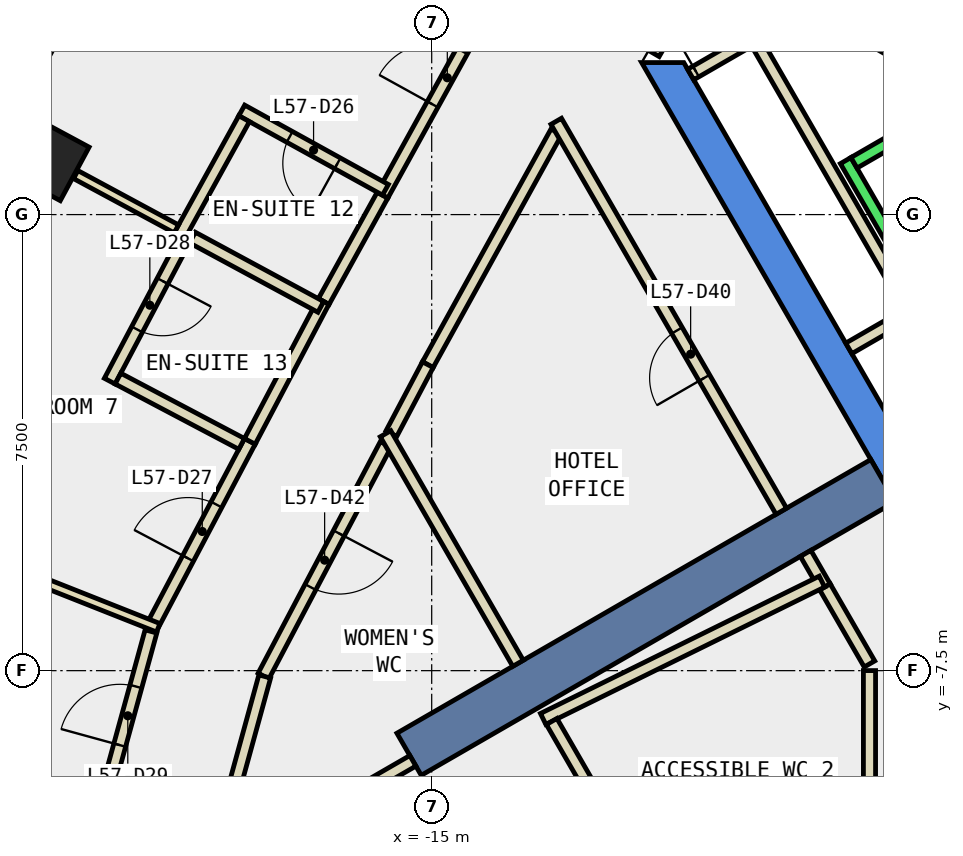
"""IFC4 building model, lengths in metres.
Left out: names, types, materials, properties, quantities, classifications, styles, units other than length and angle.
Written with IfcOpenShell. Run it as: python <this file> out.ifc"""

import sys

from ifc_helpers import new_model, si_unit, direction, frame, frame_2d, origin, origin_2d, place, context, subcontext, project, spatial, polyline, rectangle, outline, extrude, element, fill, save


model = new_model("IFC4")
c1 = context("Model", 3, precision=1e-05, world=origin(), true_north=direction((0.0, 1.0)))
c2 = subcontext(c1, "Body", "Model", "MODEL_VIEW")
j1 = project(units=[si_unit("LENGTHUNIT", "METRE"), si_unit("PLANEANGLEUNIT", "RADIAN")], contexts=[c1])
p1 = place(None, origin())
s1 = spatial("IfcSite", under=j1, at=p1, CompositionType="ELEMENT")
p2 = place(p1, origin())
s2 = spatial("IfcBuilding", under=s1, at=p2, CompositionType="ELEMENT")
p3 = place(p2, frame((0.0, 0.0, 252.2)))
s3 = spatial("IfcBuildingStorey", under=s2, at=p3, CompositionType="ELEMENT", Elevation=252.2)
p4 = place(p3, frame((-21.488, 1.001, -0.34), z_axis=(0.0, 0.0, 1.0), x_axis=(0.473980634908, 0.880535267739, 0.0)))
e1 = element("IfcColumn", 1, at=p4, inside=s3, PredefinedType="COLUMN", context=c2, shape_type="SweptSolid", body=[
    extrude(rectangle(XDim=1.0, YDim=1.4, at=origin_2d()), origin(), (0.0, 0.0, 1.0), 3.6),
])
p5 = place(p3, frame((0.0, 0.0, -0.34)))
e2 = element("IfcWall", 2, at=p5, inside=s3, PredefinedType="SHEAR", context=c2, shape_type="SweptSolid", body=[
    extrude(outline(polyline([(-11.547, 2.5), (-5.774, -7.5), (-5.427, -6.9), (-10.854, 2.5), (-11.547, 2.5)])), origin(), (0.0, 0.0, 1.0), 3.6),
])
p6 = place(p3, frame((-7.578, -4.375, -0.34), z_axis=(0.0, 0.0, 1.0), x_axis=(-0.866024315419, -0.5000018851, 0.0)))
e3 = element("IfcWall", 3, at=p6, inside=s3, PredefinedType="SHEAR", context=c2, shape_type="SweptSolid", body=[
    extrude(rectangle(XDim=9.0, YDim=0.8, at=frame_2d((4.5, 0.0))), origin(), (0.0, 0.0, 1.0), 3.6),
])
p7 = place(p3, frame((-19.199, 6.697, 0.0), z_axis=(0.0, 0.0, 1.0), x_axis=(-0.483469062695, -0.875361448441, 0.0)))
e4 = element("IfcWall", 4, at=p7, inside=s3, PredefinedType="STANDARD", context=c2, shape_type="SweptSolid", body=[
    extrude(rectangle(XDim=5.601, YDim=0.3, at=frame_2d((2.801, 0.0))), origin(), (0.0, 0.0, 1.0), 3.26),
])
p8 = place(p7, frame((0.45, 0.0, 0.9)))
e5 = element("IfcOpeningElement", 5, at=p8, cuts=e4, PredefinedType="OPENING", context=c2, shape_type="SweptSolid", body=[
    extrude(rectangle(XDim=1.9, YDim=2.0, at=frame_2d((0.95, 1.0))), frame((0.0, 0.16, 0.0), z_axis=(0.0, -1.0, 0.0), x_axis=(1.0, 0.0, 0.0)), (0.0, 0.0, 1.0), 0.32),
])
p9 = place(p7, frame((3.251, 0.0, 0.9)))
e6 = element("IfcOpeningElement", 6, at=p9, cuts=e4, PredefinedType="OPENING", context=c2, shape_type="SweptSolid", body=[
    extrude(rectangle(XDim=1.9, YDim=2.0, at=frame_2d((0.95, 1.0))), frame((0.0, 0.16, 0.0), z_axis=(0.0, -1.0, 0.0), x_axis=(1.0, 0.0, 0.0)), (0.0, 0.0, 1.0), 0.32),
])
p10 = place(p3, frame((-8.532, -6.123, 0.0), z_axis=(0.0, 0.0, 1.0), x_axis=(-0.499977104415, 0.866038622153, 0.0)))
e7 = element("IfcWall", 7, at=p10, inside=s3, PredefinedType="PARTITIONING", context=c2, shape_type="SweptSolid", body=[
    extrude(rectangle(XDim=0.636, YDim=0.2, at=frame_2d((0.318, 0.0))), origin(), (0.0, 0.0, 1.0), 3.26),
])
p11 = place(p3, frame((-12.95, 1.36, 0.0), z_axis=(0.0, 0.0, 1.0), x_axis=(-0.483418231124, -0.875389521194, 0.0)))
e8 = element("IfcWall", 8, at=p11, inside=s3, PredefinedType="PARTITIONING", context=c2, shape_type="SweptSolid", body=[
    extrude(rectangle(XDim=4.373, YDim=0.2, at=frame_2d((2.187, 0.0))), origin(), (0.0, 0.0, 1.0), 3.26),
])
p12 = place(p3, frame((-15.064, -2.468, 0.0), z_axis=(0.0, 0.0, 1.0), x_axis=(-0.467126648849, -0.884190417238, 0.0)))
e9 = element("IfcWall", 9, at=p12, inside=s3, PredefinedType="PARTITIONING", context=c2, shape_type="SweptSolid", body=[
    extrude(rectangle(XDim=1.282, YDim=0.2, at=frame_2d((0.641, 0.0))), origin(), (0.0, 0.0, 1.0), 3.26),
])
p13 = place(p3, frame((-7.8, -7.39, 0.0), z_axis=(0.0, 0.0, 1.0), x_axis=(-0.500266477503, 0.865871498253, 0.0)))
e10 = element("IfcWall", 10, at=p13, inside=s3, PredefinedType="PARTITIONING", context=c2, shape_type="SweptSolid", body=[
    extrude(rectangle(XDim=1.463, YDim=0.2, at=frame_2d((0.731, 0.0))), origin(), (0.0, 0.0, 1.0), 3.26),
])
p14 = place(p3, frame((-15.756, -3.779, 0.0), z_axis=(0.0, 0.0, 1.0), x_axis=(-0.46672043873, -0.884404902786, 0.0)))
e11 = element("IfcWall", 11, at=p14, inside=s3, PredefinedType="PARTITIONING", context=c2, shape_type="SweptSolid", body=[
    extrude(rectangle(XDim=4.307, YDim=0.2, at=frame_2d((2.153, 0.0))), origin(), (0.0, 0.0, 1.0), 3.26),
])
p15 = place(p14, frame((1.653, 0.0, 0.0)))
e12 = element("IfcOpeningElement", 12, at=p15, cuts=e11, PredefinedType="OPENING", context=c2, shape_type="SweptSolid", body=[
    extrude(rectangle(XDim=1.0, YDim=2.1, at=frame_2d((0.5, 1.05))), frame((0.0, 0.11, 0.0), z_axis=(0.0, -1.0, 0.0), x_axis=(1.0, 0.0, 0.0)), (0.0, 0.0, 1.0), 0.22),
])
p16 = place(p3, frame((-17.746, -7.596, 0.0), z_axis=(0.0, 0.0, 1.0), x_axis=(-0.264859637197, -0.96428697626, 0.0)))
e13 = element("IfcWall", 13, at=p16, inside=s3, PredefinedType="PARTITIONING", context=c2, shape_type="SweptSolid", body=[
    extrude(rectangle(XDim=2.122, YDim=0.2, at=frame_2d((1.061, 0.0))), origin(), (0.0, 0.0, 1.0), 3.26),
])
p17 = place(p3, frame((-15.809, 0.32, 0.0), z_axis=(0.0, 0.0, 1.0), x_axis=(0.483322920175, 0.875442148193, 0.0)))
e14 = element("IfcWall", 14, at=p17, inside=s3, PredefinedType="PARTITIONING", context=c2, shape_type="SweptSolid", body=[
    extrude(rectangle(XDim=4.31, YDim=0.2, at=frame_2d((2.155, 0.0))), origin(), (0.0, 0.0, 1.0), 3.26),
])
p18 = place(p17, frame((1.705, 0.0, 0.0)))
e15 = element("IfcOpeningElement", 15, at=p18, cuts=e14, PredefinedType="OPENING", context=c2, shape_type="SweptSolid", body=[
    extrude(rectangle(XDim=1.0, YDim=2.1, at=frame_2d((0.5, 1.05))), frame((0.0, 0.11, 0.0), z_axis=(0.0, -1.0, 0.0), x_axis=(1.0, 0.0, 0.0)), (0.0, 0.0, 1.0), 0.22),
])
p19 = place(p3, frame((-16.776, -1.43, 0.0), z_axis=(0.0, 0.0, 1.0), x_axis=(0.48360724937, 0.87528511261, 0.0)))
e16 = element("IfcWall", 16, at=p19, inside=s3, PredefinedType="PARTITIONING", context=c2, shape_type="SweptSolid", body=[
    extrude(rectangle(XDim=1.997, YDim=0.2, at=frame_2d((0.999, 0.0))), origin(), (0.0, 0.0, 1.0), 3.26),
])
p20 = place(p3, frame((-19.602, -6.781, 0.0), z_axis=(0.0, 0.0, 1.0), x_axis=(0.466827780692, 0.884348247679, 0.0)))
e17 = element("IfcWall", 17, at=p20, inside=s3, PredefinedType="PARTITIONING", context=c2, shape_type="SweptSolid", body=[
    extrude(rectangle(XDim=3.451, YDim=0.2, at=frame_2d((1.726, 0.0))), origin(), (0.0, 0.0, 1.0), 3.26),
])
p21 = place(p20, frame((1.275, 0.0, 0.0)))
e18 = element("IfcOpeningElement", 18, at=p21, cuts=e17, PredefinedType="OPENING", context=c2, shape_type="SweptSolid", body=[
    extrude(rectangle(XDim=1.0, YDim=2.1, at=frame_2d((0.5, 1.05))), frame((0.0, 0.11, 0.0), z_axis=(0.0, -1.0, 0.0), x_axis=(1.0, 0.0, 0.0)), (0.0, 0.0, 1.0), 0.22),
])
p22 = place(p3, frame((-17.991, -3.729, 0.0), z_axis=(0.0, 0.0, 1.0), x_axis=(0.466450569784, 0.88454726609, 0.0)))
e19 = element("IfcWall", 19, at=p22, inside=s3, PredefinedType="PARTITIONING", context=c2, shape_type="SweptSolid", body=[
    extrude(rectangle(XDim=2.6, YDim=0.2, at=frame_2d((1.3, 0.0))), origin(), (0.0, 0.0, 1.0), 3.26),
])
p23 = place(p3, frame((-20.379, -9.629, 0.0), z_axis=(0.0, 0.0, 1.0), x_axis=(0.26487636938, 0.964282380293, 0.0)))
e20 = element("IfcWall", 20, at=p23, inside=s3, PredefinedType="PARTITIONING", context=c2, shape_type="SweptSolid", body=[
    extrude(rectangle(XDim=2.877, YDim=0.2, at=frame_2d((1.438, 0.0))), origin(), (0.0, 0.0, 1.0), 3.26),
])
p24 = place(p23, frame((0.938, 0.0, 0.0)))
e21 = element("IfcOpeningElement", 21, at=p24, cuts=e20, PredefinedType="OPENING", context=c2, shape_type="SweptSolid", body=[
    extrude(rectangle(XDim=1.0, YDim=2.1, at=frame_2d((0.5, 1.05))), frame((0.0, 0.11, 0.0), z_axis=(0.0, -1.0, 0.0), x_axis=(1.0, 0.0, 0.0)), (0.0, 0.0, 1.0), 0.22),
])
p25 = place(p3, frame((-10.741, 2.303, 0.0), z_axis=(0.0, 0.0, 1.0), x_axis=(0.866063652425, 0.499933745558, 0.0)))
e22 = element("IfcWall", 22, at=p25, inside=s3, PredefinedType="PARTITIONING", context=c2, shape_type="SweptSolid", body=[
    extrude(rectangle(XDim=1.1, YDim=0.2, at=frame_2d((0.55, 0.0))), origin(), (0.0, 0.0, 1.0), 3.26),
])
p26 = place(p25, frame((0.1, 0.0, 0.0)))
e23 = element("IfcOpeningElement", 23, at=p26, cuts=e22, PredefinedType="OPENING", context=c2, shape_type="SweptSolid", body=[
    extrude(rectangle(XDim=0.9, YDim=2.1, at=frame_2d((0.45, 1.05))), frame((0.0, 0.11, 0.0), z_axis=(0.0, -1.0, 0.0), x_axis=(1.0, 0.0, 0.0)), (0.0, 0.0, 1.0), 0.22),
])
p27 = place(p3, frame((-9.751, 2.99, 0.0), z_axis=(0.0, 0.0, 1.0), x_axis=(0.499955951776, -0.866050833545, 0.0)))
e24 = element("IfcWall", 24, at=p27, inside=s3, PredefinedType="PARTITIONING", context=c2, shape_type="SweptSolid", body=[
    extrude(rectangle(XDim=5.4, YDim=0.2, at=frame_2d((2.7, 0.0))), origin(), (0.0, 0.0, 1.0), 3.26),
])
p28 = place(p3, frame((-7.188, -1.65, 0.0), z_axis=(0.0, 0.0, 1.0), x_axis=(-0.865841558281, -0.500318294642, 0.0)))
e25 = element("IfcWall", 25, at=p28, inside=s3, PredefinedType="PARTITIONING", context=c2, shape_type="SweptSolid", body=[
    extrude(rectangle(XDim=1.099, YDim=0.2, at=frame_2d((0.55, 0.0))), origin(), (0.0, 0.0, 1.0), 3.26),
])
p29 = place(p3, frame((-7.8, -12.184, 0.0), z_axis=(0.0, 0.0, 1.0), x_axis=(0.0, 1.0, 0.0)))
e26 = element("IfcWall", 26, at=p29, inside=s3, PredefinedType="PARTITIONING", context=c2, shape_type="SweptSolid", body=[
    extrude(rectangle(XDim=4.685, YDim=0.2, at=frame_2d((2.343, 0.0))), origin(), (0.0, 0.0, 1.0), 3.26),
])
p30 = place(p3, frame((-8.582, -6.036, 0.0), z_axis=(0.0, 0.0, 1.0), x_axis=(-0.897105141673, -0.441817116897, 0.0)))
e27 = element("IfcWall", 27, at=p30, inside=s3, PredefinedType="PARTITIONING", context=c2, shape_type="SweptSolid", body=[
    extrude(rectangle(XDim=5.111, YDim=0.2, at=frame_2d((2.555, 0.0))), origin(), (0.0, 0.0, 1.0), 3.26),
])
p31 = place(p3, frame((-13.58, -7.379, 0.0), z_axis=(0.0, 0.0, 1.0), x_axis=(-0.499916403993, 0.866073662582, 0.0)))
e28 = element("IfcWall", 28, at=p31, inside=s3, PredefinedType="PARTITIONING", context=c2, shape_type="SweptSolid", body=[
    extrude(rectangle(XDim=4.359, YDim=0.2, at=frame_2d((2.179, 0.0))), origin(), (0.0, 0.0, 1.0), 3.26),
])
p32 = place(p3, frame((-10.876, -12.062, 0.0), z_axis=(0.0, 0.0, 1.0), x_axis=(-0.499977877545, 0.866038175813, 0.0)))
e29 = element("IfcWall", 29, at=p32, inside=s3, PredefinedType="PARTITIONING", context=c2, shape_type="SweptSolid", body=[
    extrude(rectangle(XDim=4.302, YDim=0.2, at=frame_2d((2.151, 0.0))), origin(), (0.0, 0.0, 1.0), 3.26),
])
p33 = place(p3, frame((-15.31, -8.983, 0.0), z_axis=(0.0, 0.0, 1.0), x_axis=(-0.866047943894, -0.499960957353, 0.0)))
e30 = element("IfcWall", 30, at=p33, inside=s3, PredefinedType="PARTITIONING", context=c2, shape_type="SweptSolid", body=[
    extrude(rectangle(XDim=3.16, YDim=0.2, at=frame_2d((1.58, 0.0))), origin(), (0.0, 0.0, 1.0), 3.26),
])
p34 = place(p3, frame((-15.761, 0.408, 0.0), z_axis=(0.0, 0.0, 1.0), x_axis=(-0.875391622802, 0.483414425445, 0.0)))
e31 = element("IfcWall", 31, at=p34, inside=s3, PredefinedType="PARTITIONING", context=c2, shape_type="SweptSolid", body=[
    extrude(rectangle(XDim=2.699, YDim=0.2, at=frame_2d((1.35, 0.0))), origin(), (0.0, 0.0, 1.0), 3.26),
])
p35 = place(p34, frame((0.9, 0.0, 0.0)))
e32 = element("IfcOpeningElement", 32, at=p35, cuts=e31, PredefinedType="OPENING", context=c2, shape_type="SweptSolid", body=[
    extrude(rectangle(XDim=0.9, YDim=2.1, at=frame_2d((0.45, 1.05))), frame((0.0, 0.11, 0.0), z_axis=(0.0, -1.0, 0.0), x_axis=(1.0, 0.0, 0.0)), (0.0, 0.0, 1.0), 0.22),
])
p36 = place(p3, frame((-18.085, 1.577, 0.0), z_axis=(0.0, 0.0, 1.0), x_axis=(-0.483329790342, -0.875438355207, 0.0)))
e33 = element("IfcWall", 33, at=p36, inside=s3, PredefinedType="PARTITIONING", context=c2, shape_type="SweptSolid", body=[
    extrude(rectangle(XDim=2.224, YDim=0.2, at=frame_2d((1.112, 0.0))), origin(), (0.0, 0.0, 1.0), 3.26),
])
p37 = place(p3, frame((-19.199, -0.235, 0.0), z_axis=(0.0, 0.0, 1.0), x_axis=(-0.880166754904, 0.474664601126, 0.0)))
e34 = element("IfcWall", 34, at=p37, inside=s3, PredefinedType="PARTITIONING", context=c2, shape_type="SweptSolid", body=[
    extrude(rectangle(XDim=1.881, YDim=0.15, at=frame_2d((0.941, 0.0))), origin(), (0.0, 0.0, 1.0), 3.26),
])
p38 = place(p3, frame((-16.824, -1.518, 0.0), z_axis=(0.0, 0.0, 1.0), x_axis=(-0.879879019938, 0.47519775912, 0.0)))
e35 = element("IfcWall", 35, at=p38, inside=s3, PredefinedType="PARTITIONING", context=c2, shape_type="SweptSolid", body=[
    extrude(rectangle(XDim=2.399, YDim=0.2, at=frame_2d((1.2, 0.0))), origin(), (0.0, 0.0, 1.0), 3.26),
])
p39 = place(p3, frame((-19.069, -0.418, 0.0), z_axis=(0.0, 0.0, 1.0), x_axis=(-0.467007153784, -0.884253537349, 0.0)))
e36 = element("IfcWall", 36, at=p39, inside=s3, PredefinedType="PARTITIONING", context=c2, shape_type="SweptSolid", body=[
    extrude(rectangle(XDim=2.625, YDim=0.2, at=frame_2d((1.312, 0.0))), origin(), (0.0, 0.0, 1.0), 3.26),
])
p40 = place(p39, frame((0.763, 0.0, 0.0)))
e37 = element("IfcOpeningElement", 37, at=p40, cuts=e36, PredefinedType="OPENING", context=c2, shape_type="SweptSolid", body=[
    extrude(rectangle(XDim=0.9, YDim=2.1, at=frame_2d((0.45, 1.05))), frame((0.0, 0.11, 0.0), z_axis=(0.0, -1.0, 0.0), x_axis=(1.0, 0.0, 0.0)), (0.0, 0.0, 1.0), 0.22),
])
p41 = place(p3, frame((-20.16, -2.697, 0.0), z_axis=(0.0, 0.0, 1.0), x_axis=(0.884293452572, -0.466931568583, 0.0)))
e38 = element("IfcWall", 38, at=p41, inside=s3, PredefinedType="PARTITIONING", context=c2, shape_type="SweptSolid", body=[
    extrude(rectangle(XDim=2.3, YDim=0.2, at=frame_2d((1.15, 0.0))), origin(), (0.0, 0.0, 1.0), 3.26),
])
p42 = place(p3, frame((-19.497, -6.795, 0.0), z_axis=(0.0, 0.0, 1.0), x_axis=(-0.929826906887, 0.367997178289, 0.0)))
e39 = element("IfcWall", 39, at=p42, inside=s3, PredefinedType="PARTITIONING", context=c2, shape_type="SweptSolid", body=[
    extrude(rectangle(XDim=4.717, YDim=0.15, at=frame_2d((2.358, 0.0))), origin(), (0.0, 0.0, 1.0), 3.26),
])
p43 = place(p3, frame((-10.449, 4.203, 0.0), z_axis=(0.0, 0.0, 1.0), x_axis=(-0.499914839587, -0.866074565589, 0.0)))
e40 = element("IfcWall", 40, at=p43, inside=s3, PredefinedType="PARTITIONING", context=c2, shape_type="SweptSolid", body=[
    extrude(rectangle(XDim=1.794, YDim=0.2, at=frame_2d((0.897, 0.0))), origin(), (0.0, 0.0, 1.0), 2.4),
])
p44 = place(p43, frame((0.397, 0.0, 0.0)))
e41 = element("IfcOpeningElement", 41, at=p44, cuts=e40, PredefinedType="OPENING", context=c2, shape_type="SweptSolid", body=[
    extrude(rectangle(XDim=1.0, YDim=2.1, at=frame_2d((0.5, 1.05))), frame((0.0, 0.11, 0.0), z_axis=(0.0, -1.0, 0.0), x_axis=(1.0, 0.0, 0.0)), (0.0, 0.0, 1.0), 0.22),
])
p45 = place(p3, frame((-9.25, -4.879, 0.0), z_axis=(0.0, 0.0, 1.0), x_axis=(-0.499944124422, 0.866057661161, 0.0)))
e42 = element("IfcWall", 42, at=p45, inside=s3, PredefinedType="PARTITIONING", context=c2, shape_type="SweptSolid", body=[
    extrude(rectangle(XDim=7.405, YDim=0.2, at=frame_2d((3.702, 0.0))), origin(), (0.0, 0.0, 1.0), 3.26),
])
p46 = place(p45, frame((2.533, 0.0, 0.0)))
e43 = element("IfcOpeningElement", 43, at=p46, cuts=e42, PredefinedType="OPENING", context=c2, shape_type="SweptSolid", body=[
    extrude(rectangle(XDim=0.9, YDim=2.1, at=frame_2d((0.45, 1.05))), frame((0.0, 0.11, 0.0), z_axis=(0.0, -1.0, 0.0), x_axis=(1.0, 0.0, 0.0)), (0.0, 0.0, 1.0), 0.22),
])
p47 = place(p3, frame((-8.192, 0.888, 0.0), z_axis=(0.0, 0.0, 1.0), x_axis=(0.500034260056, -0.866005622828, 0.0)))
e44 = element("IfcWall", 44, at=p47, inside=s3, PredefinedType="STANDARD", context=c2, shape_type="SweptSolid", body=[
    extrude(rectangle(XDim=5.399, YDim=0.2, at=frame_2d((2.7, 0.0))), origin(), (0.0, 0.0, 1.0), 3.26),
])
p48 = place(p3, frame((-5.977, 2.052, 0.0), z_axis=(0.0, 0.0, 1.0), x_axis=(-0.865973769406, -0.500089422704, 0.0)))
e45 = element("IfcWall", 45, at=p48, inside=s3, PredefinedType="STANDARD", context=c2, shape_type="SweptSolid", body=[
    extrude(rectangle(XDim=2.399, YDim=0.2, at=frame_2d((1.2, 0.0))), origin(), (0.0, 0.0, 1.0), 3.26),
])
p49 = place(p3, frame((-6.25, 2.01, 0.0), z_axis=(0.0, 0.0, 1.0), x_axis=(-0.86611865017, 0.499838457731, 0.0)))
e46 = element("IfcWall", 46, at=p49, inside=s3, PredefinedType="STANDARD", context=c2, shape_type="SweptSolid", body=[
    extrude(rectangle(XDim=2.733, YDim=0.2, at=frame_2d((1.366, 0.0))), origin(), (0.0, 0.0, 1.0), 3.26),
])
p50 = place(p9, origin())
e47 = element("IfcWindow", 47, at=p50, inside=s3, PartitioningType="SINGLE_PANEL", PredefinedType="WINDOW", context=c2, shape_type="SweptSolid", body=[
    extrude(rectangle(XDim=1.9, YDim=2.0, at=frame_2d((0.95, 1.0))), frame((0.0, 0.03, 0.0), z_axis=(0.0, -1.0, 0.0), x_axis=(1.0, 0.0, 0.0)), (0.0, 0.0, 1.0), 0.06),
])
fill(e6, e47)
p51 = place(p18, origin())
e48 = element("IfcDoor", 48, at=p51, inside=s3, OperationType="SINGLE_SWING_RIGHT", PredefinedType="DOOR", context=c2, shape_type="SweptSolid", body=[
    extrude(rectangle(XDim=1.0, YDim=2.1, at=frame_2d((0.5, 1.05))), frame((0.0, 0.025, 0.0), z_axis=(0.0, -1.0, 0.0), x_axis=(1.0, 0.0, 0.0)), (0.0, 0.0, 1.0), 0.05),
])
fill(e15, e48)
p52 = place(p35, origin())
e49 = element("IfcDoor", 49, at=p52, inside=s3, OperationType="SINGLE_SWING_LEFT", PredefinedType="DOOR", context=c2, shape_type="SweptSolid", body=[
    extrude(rectangle(XDim=0.9, YDim=2.1, at=frame_2d((0.45, 1.05))), frame((0.0, 0.025, 0.0), z_axis=(0.0, -1.0, 0.0), x_axis=(1.0, 0.0, 0.0)), (0.0, 0.0, 1.0), 0.05),
])
fill(e32, e49)
p53 = place(p21, origin())
e50 = element("IfcDoor", 50, at=p53, inside=s3, OperationType="SINGLE_SWING_LEFT", PredefinedType="DOOR", context=c2, shape_type="SweptSolid", body=[
    extrude(rectangle(XDim=1.0, YDim=2.1, at=frame_2d((0.5, 1.05))), frame((0.0, 0.025, 0.0), z_axis=(0.0, -1.0, 0.0), x_axis=(1.0, 0.0, 0.0)), (0.0, 0.0, 1.0), 0.05),
])
fill(e18, e50)
p54 = place(p40, origin())
e51 = element("IfcDoor", 51, at=p54, inside=s3, OperationType="SINGLE_SWING_LEFT", PredefinedType="DOOR", context=c2, shape_type="SweptSolid", body=[
    extrude(rectangle(XDim=0.9, YDim=2.1, at=frame_2d((0.45, 1.05))), frame((0.0, 0.025, 0.0), z_axis=(0.0, -1.0, 0.0), x_axis=(1.0, 0.0, 0.0)), (0.0, 0.0, 1.0), 0.05),
])
fill(e37, e51)
p55 = place(p24, origin())
e52 = element("IfcDoor", 52, at=p55, inside=s3, OperationType="SINGLE_SWING_LEFT", PredefinedType="DOOR", context=c2, shape_type="SweptSolid", body=[
    extrude(rectangle(XDim=1.0, YDim=2.1, at=frame_2d((0.5, 1.05))), frame((0.0, 0.025, 0.0), z_axis=(0.0, -1.0, 0.0), x_axis=(1.0, 0.0, 0.0)), (0.0, 0.0, 1.0), 0.05),
])
fill(e21, e52)
p56 = place(p46, origin())
e53 = element("IfcDoor", 53, at=p56, inside=s3, OperationType="SINGLE_SWING_RIGHT", PredefinedType="DOOR", context=c2, shape_type="SweptSolid", body=[
    extrude(rectangle(XDim=0.9, YDim=2.1, at=frame_2d((0.45, 1.05))), frame((0.0, 0.025, 0.0), z_axis=(0.0, -1.0, 0.0), x_axis=(1.0, 0.0, 0.0)), (0.0, 0.0, 1.0), 0.05),
])
fill(e43, e53)
p57 = place(p15, origin())
e54 = element("IfcDoor", 54, at=p57, inside=s3, OperationType="SINGLE_SWING_LEFT", PredefinedType="DOOR", context=c2, shape_type="SweptSolid", body=[
    extrude(rectangle(XDim=1.0, YDim=2.1, at=frame_2d((0.5, 1.05))), frame((0.0, 0.025, 0.0), z_axis=(0.0, -1.0, 0.0), x_axis=(1.0, 0.0, 0.0)), (0.0, 0.0, 1.0), 0.05),
])
fill(e12, e54)
p58 = place(p26, origin())
e55 = element("IfcDoor", 55, at=p58, inside=s3, OperationType="SINGLE_SWING_RIGHT", PredefinedType="DOOR", context=c2, shape_type="SweptSolid", body=[
    extrude(rectangle(XDim=0.9, YDim=2.1, at=frame_2d((0.45, 1.05))), frame((0.0, 0.025, 0.0), z_axis=(0.0, -1.0, 0.0), x_axis=(1.0, 0.0, 0.0)), (0.0, 0.0, 1.0), 0.05),
])
fill(e23, e55)
save(model, sys.argv[1])
